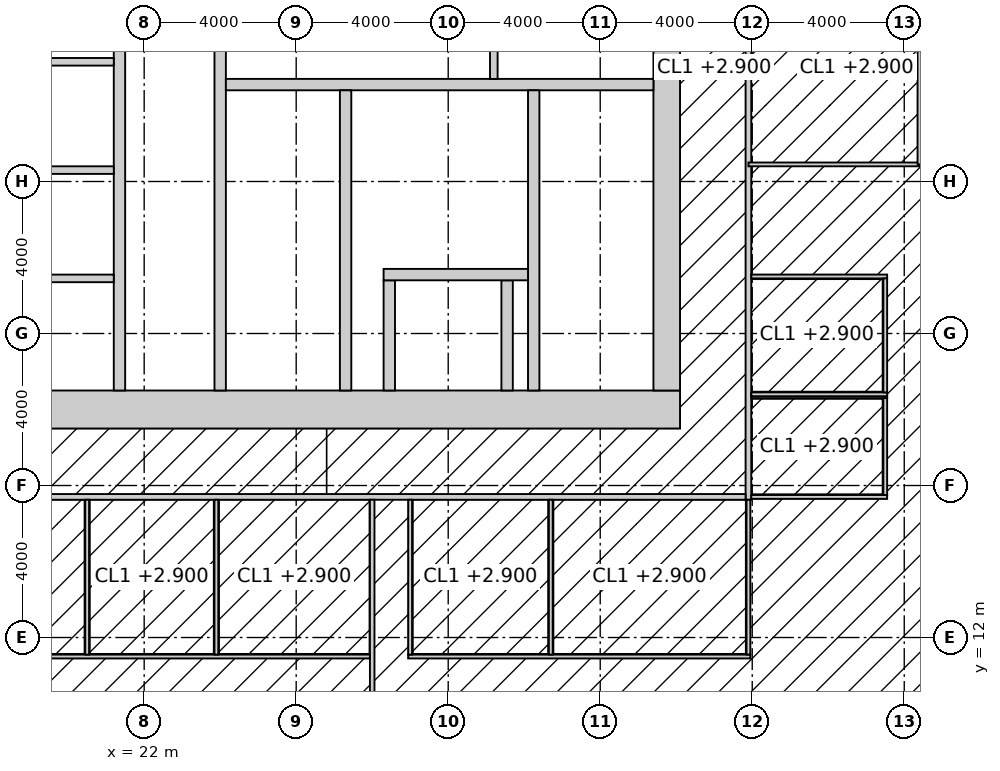
"""IFC4 building model, lengths in metres.
Left out: names, types, materials, properties, quantities, classifications, styles, units other than length and angle.
Written with IfcOpenShell. Run it as: python <this file> out.ifc"""

import sys

from ifc_helpers import new_model, si_unit, direction, frame, frame_2d, origin, place, context, subcontext, project, spatial, rectangle, extrude, element, fill, save


model = new_model("IFC4")
c1 = context("Model", 3, precision=1e-05, world=origin(), true_north=direction((0.0, 1.0)))
c2 = subcontext(c1, "Body", "Model", "MODEL_VIEW")
j1 = project(units=[si_unit("LENGTHUNIT", "METRE"), si_unit("PLANEANGLEUNIT", "RADIAN")], contexts=[c1])
p1 = place(None, origin())
s1 = spatial("IfcSite", under=j1, at=p1, CompositionType="ELEMENT")
p2 = place(p1, origin())
s2 = spatial("IfcBuilding", under=s1, at=p2, CompositionType="ELEMENT")
p3 = place(p2, frame((0.0, 0.0, 147.8)))
s3 = spatial("IfcBuildingStorey", under=s2, at=p3, CompositionType="ELEMENT", Elevation=147.8)
p4 = place(p3, frame((18.5, 18.0, -0.15), z_axis=(0.0, 0.0, 1.0), x_axis=(1.0, 0.0, 0.0)))
e1 = element("IfcWall", 1, at=p4, inside=s3, PredefinedType="SHEAR", context=c2, shape_type="SweptSolid", body=[
    extrude(rectangle(XDim=17.6, YDim=1.0, at=frame_2d((8.8, 0.0))), origin(), (0.0, 0.0, 1.0), 4.0),
])
p5 = place(p4, frame((3.45, 0.0, 0.15)))
e2 = element("IfcOpeningElement", 2, at=p5, cuts=e1, PredefinedType="OPENING", context=c2, shape_type="SweptSolid", body=[
    extrude(rectangle(XDim=1.5, YDim=2.4, at=frame_2d((0.75, 1.2))), frame((0.0, 0.51, 0.0), z_axis=(0.0, -1.0, 0.0), x_axis=(1.0, 0.0, 0.0)), (0.0, 0.0, 1.0), 1.02),
])
p6 = place(p3, frame((35.75, 18.5, -0.15), z_axis=(0.0, 0.0, 1.0), x_axis=(0.0, 1.0, 0.0)))
e3 = element("IfcWall", 3, at=p6, inside=s3, PredefinedType="SHEAR", context=c2, shape_type="SweptSolid", body=[
    extrude(rectangle(XDim=17.0, YDim=0.7, at=frame_2d((8.5, 0.0))), origin(), (0.0, 0.0, 1.0), 4.0),
])
p7 = place(p6, frame((9.85, 0.0, 0.15)))
e4 = element("IfcOpeningElement", 4, at=p7, cuts=e3, PredefinedType="OPENING", context=c2, shape_type="SweptSolid", body=[
    extrude(rectangle(XDim=1.0, YDim=2.2, at=frame_2d((0.5, 1.1))), frame((0.0, 0.36, 0.0), z_axis=(0.0, -1.0, 0.0), x_axis=(1.0, 0.0, 0.0)), (0.0, 0.0, 1.0), 0.72),
])
p8 = place(p3, frame((24.0, 18.5, -0.15), z_axis=(0.0, 0.0, 1.0), x_axis=(0.0, 1.0, 0.0)))
e5 = element("IfcWall", 5, at=p8, inside=s3, PredefinedType="SHEAR", context=c2, shape_type="SweptSolid", body=[
    extrude(rectangle(XDim=17.0, YDim=0.3, at=frame_2d((8.5, 0.0))), origin(), (0.0, 0.0, 1.0), 4.0),
])
p9 = place(p8, frame((9.6, 0.0, 0.15)))
e6 = element("IfcOpeningElement", 6, at=p9, cuts=e5, PredefinedType="OPENING", context=c2, shape_type="SweptSolid", body=[
    extrude(rectangle(XDim=1.5, YDim=2.4, at=frame_2d((0.75, 1.2))), frame((0.0, 0.16, 0.0), z_axis=(0.0, -1.0, 0.0), x_axis=(1.0, 0.0, 0.0)), (0.0, 0.0, 1.0), 0.32),
])
p10 = place(p3, frame((24.15, 26.55, -0.15), z_axis=(0.0, 0.0, 1.0), x_axis=(1.0, 0.0, 0.0)))
e7 = element("IfcWall", 7, at=p10, inside=s3, PredefinedType="SHEAR", context=c2, shape_type="SweptSolid", body=[
    extrude(rectangle(XDim=11.25, YDim=0.3, at=frame_2d((5.625, 0.0))), origin(), (0.0, 0.0, 1.0), 4.0),
])
p11 = place(p10, frame((9.25, 0.0, 0.15)))
e8 = element("IfcOpeningElement", 8, at=p11, cuts=e7, PredefinedType="OPENING", context=c2, shape_type="SweptSolid", body=[
    extrude(rectangle(XDim=1.0, YDim=2.2, at=frame_2d((0.5, 1.1))), frame((0.0, 0.16, 0.0), z_axis=(0.0, -1.0, 0.0), x_axis=(1.0, 0.0, 0.0)), (0.0, 0.0, 1.0), 0.32),
])
p12 = place(p10, frame((4.9, 0.0, 0.15)))
e9 = element("IfcOpeningElement", 9, at=p12, cuts=e7, PredefinedType="OPENING", context=c2, shape_type="SweptSolid", body=[
    extrude(rectangle(XDim=1.5, YDim=2.4, at=frame_2d((0.75, 1.2))), frame((0.0, 0.16, 0.0), z_axis=(0.0, -1.0, 0.0), x_axis=(1.0, 0.0, 0.0)), (0.0, 0.0, 1.0), 0.32),
])
p13 = place(p3, frame((27.3, 18.5, -0.15), z_axis=(0.0, 0.0, 1.0), x_axis=(0.0, 1.0, 0.0)))
e10 = element("IfcWall", 10, at=p13, inside=s3, PredefinedType="SHEAR", context=c2, shape_type="SweptSolid", body=[
    extrude(rectangle(XDim=7.9, YDim=0.3, at=frame_2d((3.95, 0.0))), origin(), (0.0, 0.0, 1.0), 4.0),
])
p14 = place(p13, frame((6.4, 0.0, 0.15)))
e11 = element("IfcOpeningElement", 11, at=p14, cuts=e10, PredefinedType="OPENING", context=c2, shape_type="SweptSolid", body=[
    extrude(rectangle(XDim=1.0, YDim=2.2, at=frame_2d((0.5, 1.1))), frame((0.0, 0.16, 0.0), z_axis=(0.0, -1.0, 0.0), x_axis=(1.0, 0.0, 0.0)), (0.0, 0.0, 1.0), 0.32),
])
p15 = place(p3, frame((32.25, 18.5, -0.15), z_axis=(0.0, 0.0, 1.0), x_axis=(0.0, 1.0, 0.0)))
e12 = element("IfcWall", 12, at=p15, inside=s3, PredefinedType="SHEAR", context=c2, shape_type="SweptSolid", body=[
    extrude(rectangle(XDim=7.9, YDim=0.3, at=frame_2d((3.95, 0.0))), origin(), (0.0, 0.0, 1.0), 4.0),
])
for number, where, z_axis, x_axis in (
    (13, (28.45, 18.5, -0.15), (0.0, 0.0, 1.0), (0.0, 1.0, 0.0)),
    (14, (31.55, 18.5, -0.15), (0.0, 0.0, 1.0), (0.0, 1.0, 0.0)),
):
    element("IfcWall", number, at=place(p3, frame(where, z_axis=z_axis, x_axis=x_axis)), inside=s3, PredefinedType="SHEAR", context=c2, shape_type="SweptSolid", body=[
        extrude(rectangle(XDim=2.9, YDim=0.3, at=frame_2d((1.45, 0.0))), origin(), (0.0, 0.0, 1.0), 4.0),
    ])
p16 = place(p3, frame((28.3, 21.55, -0.15), z_axis=(0.0, 0.0, 1.0), x_axis=(1.0, 0.0, 0.0)))
e15 = element("IfcWall", 15, at=p16, inside=s3, PredefinedType="SHEAR", context=c2, shape_type="SweptSolid", body=[
    extrude(rectangle(XDim=3.8, YDim=0.3, at=frame_2d((1.9, 0.0))), origin(), (0.0, 0.0, 1.0), 4.0),
])
p17 = place(p16, frame((1.05, 0.0, 0.15)))
e16 = element("IfcOpeningElement", 16, at=p17, cuts=e15, PredefinedType="OPENING", context=c2, shape_type="SweptSolid", body=[
    extrude(rectangle(XDim=1.3, YDim=2.4, at=frame_2d((0.65, 1.2))), frame((0.0, 0.16, 0.0), z_axis=(0.0, -1.0, 0.0), x_axis=(1.0, 0.0, 0.0)), (0.0, 0.0, 1.0), 0.32),
])
p18 = place(p3, frame((21.35, 18.5, -0.15), z_axis=(0.0, 0.0, 1.0), x_axis=(0.0, 1.0, 0.0)))
e17 = element("IfcWall", 17, at=p18, inside=s3, PredefinedType="SHEAR", context=c2, shape_type="SweptSolid", body=[
    extrude(rectangle(XDim=12.5, YDim=0.3, at=frame_2d((6.25, 0.0))), origin(), (0.0, 0.0, 1.0), 4.0),
])
p19 = place(p18, frame((0.875, 0.0, 0.15)))
e18 = element("IfcOpeningElement", 18, at=p19, cuts=e17, PredefinedType="OPENING", context=c2, shape_type="SweptSolid", body=[
    extrude(rectangle(XDim=1.1, YDim=2.2, at=frame_2d((0.55, 1.1))), frame((0.0, 0.16, 0.0), z_axis=(0.0, -1.0, 0.0), x_axis=(1.0, 0.0, 0.0)), (0.0, 0.0, 1.0), 0.32),
])
p20 = place(p18, frame((3.825, 0.0, 0.15)))
e19 = element("IfcOpeningElement", 19, at=p20, cuts=e17, PredefinedType="OPENING", context=c2, shape_type="SweptSolid", body=[
    extrude(rectangle(XDim=1.1, YDim=2.2, at=frame_2d((0.55, 1.1))), frame((0.0, 0.16, 0.0), z_axis=(0.0, -1.0, 0.0), x_axis=(1.0, 0.0, 0.0)), (0.0, 0.0, 1.0), 0.32),
])
p21 = place(p18, frame((6.675, 0.0, 0.15)))
e20 = element("IfcOpeningElement", 20, at=p21, cuts=e17, PredefinedType="OPENING", context=c2, shape_type="SweptSolid", body=[
    extrude(rectangle(XDim=1.1, YDim=2.2, at=frame_2d((0.55, 1.1))), frame((0.0, 0.16, 0.0), z_axis=(0.0, -1.0, 0.0), x_axis=(1.0, 0.0, 0.0)), (0.0, 0.0, 1.0), 0.32),
])
p22 = place(p18, frame((9.575, 0.0, 0.15)))
e21 = element("IfcOpeningElement", 21, at=p22, cuts=e17, PredefinedType="OPENING", context=c2, shape_type="SweptSolid", body=[
    extrude(rectangle(XDim=1.1, YDim=2.2, at=frame_2d((0.55, 1.1))), frame((0.0, 0.16, 0.0), z_axis=(0.0, -1.0, 0.0), x_axis=(1.0, 0.0, 0.0)), (0.0, 0.0, 1.0), 0.32),
])
for number, where, z_axis, x_axis in (
    (22, (18.5, 21.45, -0.15), (0.0, 0.0, 1.0), (1.0, 0.0, 0.0)),
    (23, (18.5, 24.3, -0.15), (0.0, 0.0, 1.0), (1.0, 0.0, 0.0)),
    (24, (18.5, 27.15, -0.15), (0.0, 0.0, 1.0), (1.0, 0.0, 0.0)),
):
    element("IfcWall", number, at=place(p3, frame(where, z_axis=z_axis, x_axis=x_axis)), inside=s3, PredefinedType="SOLIDWALL", context=c2, shape_type="SweptSolid", body=[
        extrude(rectangle(XDim=2.7, YDim=0.2, at=frame_2d((1.35, 0.0))), origin(), (0.0, 0.0, 1.0), 4.0),
    ])
p23 = place(p3, frame((31.2, 26.7, 0.0), z_axis=(0.0, 0.0, 1.0), x_axis=(0.0, 1.0, 0.0)))
e25 = element("IfcWall", 25, at=p23, inside=s3, PredefinedType="SOLIDWALL", context=c2, shape_type="SweptSolid", body=[
    extrude(rectangle(XDim=4.3, YDim=0.2, at=frame_2d((2.15, 0.0))), origin(), (0.0, 0.0, 1.0), 3.85),
])
p24 = place(p3, frame((37.9, 15.625, 0.0), z_axis=(0.0, 0.0, 1.0), x_axis=(0.0, 1.0, 0.0)))
e26 = element("IfcWall", 26, at=p24, inside=s3, PredefinedType="PARTITIONING", context=c2, shape_type="SweptSolid", body=[
    extrude(rectangle(XDim=22.75, YDim=0.15, at=frame_2d((11.375, 0.0))), origin(), (0.0, 0.0, 1.0), 2.95),
])
p25 = place(p24, frame((10.475, 0.0, 0.0)))
e27 = element("IfcOpeningElement", 27, at=p25, cuts=e26, PredefinedType="OPENING", context=c2, shape_type="SweptSolid", body=[
    extrude(rectangle(XDim=1.8, YDim=2.4, at=frame_2d((0.9, 1.2))), frame((0.0, 0.085, 0.0), z_axis=(0.0, -1.0, 0.0), x_axis=(1.0, 0.0, 0.0)), (0.0, 0.0, 1.0), 0.17),
])
p26 = place(p3, frame((15.175, 15.7, 0.0), z_axis=(0.0, 0.0, 1.0), x_axis=(1.0, 0.0, 0.0)))
e28 = element("IfcWall", 28, at=p26, inside=s3, PredefinedType="PARTITIONING", context=c2, shape_type="SweptSolid", body=[
    extrude(rectangle(XDim=22.65, YDim=0.15, at=frame_2d((11.325, 0.0))), origin(), (0.0, 0.0, 1.0), 3.85),
])
p27 = place(p3, frame((28.0, 4.3, 0.0), z_axis=(0.0, 0.0, 1.0), x_axis=(0.0, 1.0, 0.0)))
e29 = element("IfcWall", 29, at=p27, inside=s3, PredefinedType="PARTITIONING", context=c2, shape_type="SweptSolid", body=[
    extrude(rectangle(XDim=11.325, YDim=0.12, at=frame_2d((5.663, 0.0))), origin(), (0.0, 0.0, 1.0), 3.85),
])
p28 = place(p3, frame((15.05, 11.5, 0.0), z_axis=(0.0, 0.0, 1.0), x_axis=(1.0, 0.0, 0.0)))
e30 = element("IfcWall", 30, at=p28, inside=s3, PredefinedType="PARTITIONING", context=c2, shape_type="SweptSolid", body=[
    extrude(rectangle(XDim=12.889, YDim=0.1, at=frame_2d((6.444, 0.0))), origin(), (0.0, 0.0, 1.0), 3.85),
])
p29 = place(p28, frame((2.25, 0.0, 0.0)))
e31 = element("IfcOpeningElement", 31, at=p29, cuts=e30, PredefinedType="OPENING", context=c2, shape_type="SweptSolid", body=[
    extrude(rectangle(XDim=1.0, YDim=2.2, at=frame_2d((0.5, 1.1))), frame((0.0, 0.06, 0.0), z_axis=(0.0, -1.0, 0.0), x_axis=(1.0, 0.0, 0.0)), (0.0, 0.0, 1.0), 0.12),
])
p30 = place(p28, frame((6.65, 0.0, 0.0)))
e32 = element("IfcOpeningElement", 32, at=p30, cuts=e30, PredefinedType="OPENING", context=c2, shape_type="SweptSolid", body=[
    extrude(rectangle(XDim=1.0, YDim=2.2, at=frame_2d((0.5, 1.1))), frame((0.0, 0.06, 0.0), z_axis=(0.0, -1.0, 0.0), x_axis=(1.0, 0.0, 0.0)), (0.0, 0.0, 1.0), 0.12),
])
p31 = place(p28, frame((10.399, 0.0, 0.0)))
e33 = element("IfcOpeningElement", 33, at=p31, cuts=e30, PredefinedType="OPENING", context=c2, shape_type="SweptSolid", body=[
    extrude(rectangle(XDim=1.0, YDim=2.2, at=frame_2d((0.5, 1.1))), frame((0.0, 0.06, 0.0), z_axis=(0.0, -1.0, 0.0), x_axis=(1.0, 0.0, 0.0)), (0.0, 0.0, 1.0), 0.12),
])
p32 = place(p3, frame((28.949, 11.5, 0.0), z_axis=(0.0, 0.0, 1.0), x_axis=(1.0, 0.0, 0.0)))
e34 = element("IfcWall", 34, at=p32, inside=s3, PredefinedType="PARTITIONING", context=c2, shape_type="SweptSolid", body=[
    extrude(rectangle(XDim=9.001, YDim=0.1, at=frame_2d((4.5, 0.0))), origin(), (0.0, 0.0, 1.0), 3.85),
])
p33 = place(p32, frame((1.4, 0.0, 0.0)))
e35 = element("IfcOpeningElement", 35, at=p33, cuts=e34, PredefinedType="OPENING", context=c2, shape_type="SweptSolid", body=[
    extrude(rectangle(XDim=1.0, YDim=2.2, at=frame_2d((0.5, 1.1))), frame((0.0, 0.06, 0.0), z_axis=(0.0, -1.0, 0.0), x_axis=(1.0, 0.0, 0.0)), (0.0, 0.0, 1.0), 0.12),
])
p34 = place(p32, frame((5.851, 0.0, 0.0)))
e36 = element("IfcOpeningElement", 36, at=p34, cuts=e34, PredefinedType="OPENING", context=c2, shape_type="SweptSolid", body=[
    extrude(rectangle(XDim=1.0, YDim=2.2, at=frame_2d((0.5, 1.1))), frame((0.0, 0.06, 0.0), z_axis=(0.0, -1.0, 0.0), x_axis=(1.0, 0.0, 0.0)), (0.0, 0.0, 1.0), 0.12),
])
for number, where, z_axis, x_axis in (
    (37, (37.975, 15.7, 0.0), (0.0, 0.0, 1.0), (1.0, 0.0, 0.0)),
    (38, (37.975, 18.35, 0.0), (0.0, 0.0, 1.0), (1.0, 0.0, 0.0)),
    (39, (37.975, 18.4, 0.0), (0.0, 0.0, 1.0), (1.0, 0.0, 0.0)),
    (40, (37.975, 21.5, 0.0), (0.0, 0.0, 1.0), (1.0, 0.0, 0.0)),
):
    element("IfcWall", number, at=place(p3, frame(where, z_axis=z_axis, x_axis=x_axis)), inside=s3, PredefinedType="PARTITIONING", context=c2, shape_type="SweptSolid", body=[
        extrude(rectangle(XDim=3.575, YDim=0.1, at=frame_2d((1.788, 0.0))), origin(), (0.0, 0.0, 1.0), 3.85),
    ])
for number, where, z_axis, x_axis in (
    (41, (20.5, 11.55, 0.0), (0.0, 0.0, 1.0), (0.0, 1.0, 0.0)),
    (42, (23.9, 11.55, 0.0), (0.0, 0.0, 1.0), (0.0, 1.0, 0.0)),
    (43, (28.999, 11.55, 0.0), (0.0, 0.0, 1.0), (0.0, 1.0, 0.0)),
    (44, (32.699, 11.55, 0.0), (0.0, 0.0, 1.0), (0.0, 1.0, 0.0)),
):
    element("IfcWall", number, at=place(p3, frame(where, z_axis=z_axis, x_axis=x_axis)), inside=s3, PredefinedType="PARTITIONING", context=c2, shape_type="SweptSolid", body=[
        extrude(rectangle(XDim=4.075, YDim=0.1, at=frame_2d((2.038, 0.0))), origin(), (0.0, 0.0, 1.0), 3.85),
    ])
p35 = place(p3, frame((37.9, 11.55, 0.0), z_axis=(0.0, 0.0, 1.0), x_axis=(0.0, 1.0, 0.0)))
e45 = element("IfcWall", 45, at=p35, inside=s3, PredefinedType="PARTITIONING", context=c2, shape_type="SweptSolid", body=[
    extrude(rectangle(XDim=4.075, YDim=0.1, at=frame_2d((2.038, 0.0))), origin(), (0.0, 0.0, 1.0), 2.95),
])
p36 = place(p3, frame((41.5, 15.75, 0.0), z_axis=(0.0, 0.0, 1.0), x_axis=(0.0, 1.0, 0.0)))
e46 = element("IfcWall", 46, at=p36, inside=s3, PredefinedType="PARTITIONING", context=c2, shape_type="SweptSolid", body=[
    extrude(rectangle(XDim=2.55, YDim=0.1, at=frame_2d((1.275, 0.0))), origin(), (0.0, 0.0, 1.0), 3.85),
])
p37 = place(p36, frame((0.775, 0.0, 0.0)))
e47 = element("IfcOpeningElement", 47, at=p37, cuts=e46, PredefinedType="OPENING", context=c2, shape_type="SweptSolid", body=[
    extrude(rectangle(XDim=1.0, YDim=2.2, at=frame_2d((0.5, 1.1))), frame((0.0, 0.06, 0.0), z_axis=(0.0, -1.0, 0.0), x_axis=(1.0, 0.0, 0.0)), (0.0, 0.0, 1.0), 0.12),
])
p38 = place(p3, frame((41.5, 18.45, 0.0), z_axis=(0.0, 0.0, 1.0), x_axis=(0.0, 1.0, 0.0)))
e48 = element("IfcWall", 48, at=p38, inside=s3, PredefinedType="PARTITIONING", context=c2, shape_type="SweptSolid", body=[
    extrude(rectangle(XDim=3.0, YDim=0.1, at=frame_2d((1.5, 0.0))), origin(), (0.0, 0.0, 1.0), 3.85),
])
p39 = place(p38, frame((1.0, 0.0, 0.0)))
e49 = element("IfcOpeningElement", 49, at=p39, cuts=e48, PredefinedType="OPENING", context=c2, shape_type="SweptSolid", body=[
    extrude(rectangle(XDim=1.0, YDim=2.2, at=frame_2d((0.5, 1.1))), frame((0.0, 0.06, 0.0), z_axis=(0.0, -1.0, 0.0), x_axis=(1.0, 0.0, 0.0)), (0.0, 0.0, 1.0), 0.12),
])
p40 = place(p3, frame((37.9, 24.45, 0.0), z_axis=(0.0, 0.0, 1.0), x_axis=(1.0, 0.0, 0.0)))
e50 = element("IfcWall", 50, at=p40, inside=s3, PredefinedType="PARTITIONING", context=c2, shape_type="SweptSolid", body=[
    extrude(rectangle(XDim=4.5, YDim=0.1, at=frame_2d((2.25, 0.0))), origin(), (0.0, 0.0, 1.0), 3.85),
])
p41 = place(p3, frame((42.4, 24.45, 0.0), z_axis=(0.0, 0.0, 1.0), x_axis=(0.0, 1.0, 0.0)))
e51 = element("IfcWall", 51, at=p41, inside=s3, PredefinedType="PARTITIONING", context=c2, shape_type="SweptSolid", body=[
    extrude(rectangle(XDim=5.1, YDim=0.1, at=frame_2d((2.55, 0.0))), origin(), (0.0, 0.0, 1.0), 3.85),
])
p42 = place(p41, frame((2.05, 0.0, 0.0)))
e52 = element("IfcOpeningElement", 52, at=p42, cuts=e51, PredefinedType="OPENING", context=c2, shape_type="SweptSolid", body=[
    extrude(rectangle(XDim=1.0, YDim=2.2, at=frame_2d((0.5, 1.1))), frame((0.0, 0.06, 0.0), z_axis=(0.0, -1.0, 0.0), x_axis=(1.0, 0.0, 0.0)), (0.0, 0.0, 1.0), 0.12),
])
p43 = place(p14, origin())
e53 = element("IfcDoor", 53, at=p43, inside=s3, OperationType="SINGLE_SWING_RIGHT", PredefinedType="DOOR", context=c2, shape_type="SweptSolid", body=[
    extrude(rectangle(XDim=1.0, YDim=2.2, at=frame_2d((0.5, 1.1))), frame((0.0, 0.025, 0.0), z_axis=(0.0, -1.0, 0.0), x_axis=(1.0, 0.0, 0.0)), (0.0, 0.0, 1.0), 0.05),
])
fill(e11, e53)
p44 = place(p11, frame((1.0, 0.0, 0.0), z_axis=(0.0, 0.0, 1.0), x_axis=(-1.0, 0.0, 0.0)))
e54 = element("IfcDoor", 54, at=p44, inside=s3, OperationType="SINGLE_SWING_RIGHT", PredefinedType="DOOR", context=c2, shape_type="SweptSolid", body=[
    extrude(rectangle(XDim=1.0, YDim=2.2, at=frame_2d((0.5, 1.1))), frame((0.0, 0.025, 0.0), z_axis=(0.0, -1.0, 0.0), x_axis=(1.0, 0.0, 0.0)), (0.0, 0.0, 1.0), 0.05),
])
fill(e8, e54)
p45 = place(p12, origin())
e55 = element("IfcDoor", 55, at=p45, inside=s3, OperationType="DOUBLE_DOOR_DOUBLE_SWING", PredefinedType="DOOR", context=c2, shape_type="SweptSolid", body=[
    extrude(rectangle(XDim=1.5, YDim=2.4, at=frame_2d((0.75, 1.2))), frame((0.0, 0.025, 0.0), z_axis=(0.0, -1.0, 0.0), x_axis=(1.0, 0.0, 0.0)), (0.0, 0.0, 1.0), 0.05),
])
fill(e9, e55)
p46 = place(p5, origin())
e56 = element("IfcDoor", 56, at=p46, inside=s3, OperationType="DOUBLE_DOOR_DOUBLE_SWING", PredefinedType="DOOR", context=c2, shape_type="SweptSolid", body=[
    extrude(rectangle(XDim=1.5, YDim=2.4, at=frame_2d((0.75, 1.2))), frame((0.0, 0.025, 0.0), z_axis=(0.0, -1.0, 0.0), x_axis=(1.0, 0.0, 0.0)), (0.0, 0.0, 1.0), 0.05),
])
fill(e2, e56)
p47 = place(p25, origin())
e57 = element("IfcDoor", 57, at=p47, inside=s3, OperationType="DOUBLE_DOOR_DOUBLE_SWING", PredefinedType="DOOR", context=c2, shape_type="SweptSolid", body=[
    extrude(rectangle(XDim=1.8, YDim=2.4, at=frame_2d((0.9, 1.2))), frame((0.0, 0.025, 0.0), z_axis=(0.0, -1.0, 0.0), x_axis=(1.0, 0.0, 0.0)), (0.0, 0.0, 1.0), 0.05),
])
fill(e27, e57)
p48 = place(p30, origin())
e58 = element("IfcDoor", 58, at=p48, inside=s3, OperationType="SINGLE_SWING_LEFT", PredefinedType="DOOR", context=c2, shape_type="SweptSolid", body=[
    extrude(rectangle(XDim=1.0, YDim=2.2, at=frame_2d((0.5, 1.1))), frame((0.0, 0.025, 0.0), z_axis=(0.0, -1.0, 0.0), x_axis=(1.0, 0.0, 0.0)), (0.0, 0.0, 1.0), 0.05),
])
fill(e32, e58)
p49 = place(p31, origin())
e59 = element("IfcDoor", 59, at=p49, inside=s3, OperationType="SINGLE_SWING_LEFT", PredefinedType="DOOR", context=c2, shape_type="SweptSolid", body=[
    extrude(rectangle(XDim=1.0, YDim=2.2, at=frame_2d((0.5, 1.1))), frame((0.0, 0.025, 0.0), z_axis=(0.0, -1.0, 0.0), x_axis=(1.0, 0.0, 0.0)), (0.0, 0.0, 1.0), 0.05),
])
fill(e33, e59)
p50 = place(p33, origin())
e60 = element("IfcDoor", 60, at=p50, inside=s3, OperationType="SINGLE_SWING_RIGHT", PredefinedType="DOOR", context=c2, shape_type="SweptSolid", body=[
    extrude(rectangle(XDim=1.0, YDim=2.2, at=frame_2d((0.5, 1.1))), frame((0.0, 0.025, 0.0), z_axis=(0.0, -1.0, 0.0), x_axis=(1.0, 0.0, 0.0)), (0.0, 0.0, 1.0), 0.05),
])
fill(e35, e60)
p51 = place(p34, origin())
e61 = element("IfcDoor", 61, at=p51, inside=s3, OperationType="SINGLE_SWING_LEFT", PredefinedType="DOOR", context=c2, shape_type="SweptSolid", body=[
    extrude(rectangle(XDim=1.0, YDim=2.2, at=frame_2d((0.5, 1.1))), frame((0.0, 0.025, 0.0), z_axis=(0.0, -1.0, 0.0), x_axis=(1.0, 0.0, 0.0)), (0.0, 0.0, 1.0), 0.05),
])
fill(e36, e61)
p52 = place(p37, origin())
e62 = element("IfcDoor", 62, at=p52, inside=s3, OperationType="SINGLE_SWING_LEFT", PredefinedType="DOOR", context=c2, shape_type="SweptSolid", body=[
    extrude(rectangle(XDim=1.0, YDim=2.2, at=frame_2d((0.5, 1.1))), frame((0.0, 0.025, 0.0), z_axis=(0.0, -1.0, 0.0), x_axis=(1.0, 0.0, 0.0)), (0.0, 0.0, 1.0), 0.05),
])
fill(e47, e62)
p53 = place(p39, origin())
e63 = element("IfcDoor", 63, at=p53, inside=s3, OperationType="SINGLE_SWING_LEFT", PredefinedType="DOOR", context=c2, shape_type="SweptSolid", body=[
    extrude(rectangle(XDim=1.0, YDim=2.2, at=frame_2d((0.5, 1.1))), frame((0.0, 0.025, 0.0), z_axis=(0.0, -1.0, 0.0), x_axis=(1.0, 0.0, 0.0)), (0.0, 0.0, 1.0), 0.05),
])
fill(e49, e63)
p54 = place(p42, origin())
e64 = element("IfcDoor", 64, at=p54, inside=s3, OperationType="SINGLE_SWING_RIGHT", PredefinedType="DOOR", context=c2, shape_type="SweptSolid", body=[
    extrude(rectangle(XDim=1.0, YDim=2.2, at=frame_2d((0.5, 1.1))), frame((0.0, 0.025, 0.0), z_axis=(0.0, -1.0, 0.0), x_axis=(1.0, 0.0, 0.0)), (0.0, 0.0, 1.0), 0.05),
])
fill(e52, e64)
p55 = place(p17, origin())
e65 = element("IfcDoor", 65, at=p55, inside=s3, OperationType="DOUBLE_DOOR_SLIDING", PredefinedType="DOOR", context=c2, shape_type="SweptSolid", body=[
    extrude(rectangle(XDim=1.3, YDim=2.4, at=frame_2d((0.65, 1.2))), frame((0.0, 0.025, 0.0), z_axis=(0.0, -1.0, 0.0), x_axis=(1.0, 0.0, 0.0)), (0.0, 0.0, 1.0), 0.05),
])
fill(e16, e65)
p56 = place(p19, origin())
e66 = element("IfcDoor", 66, at=p56, inside=s3, OperationType="DOUBLE_DOOR_SLIDING", PredefinedType="DOOR", context=c2, shape_type="SweptSolid", body=[
    extrude(rectangle(XDim=1.1, YDim=2.2, at=frame_2d((0.55, 1.1))), frame((0.0, 0.025, 0.0), z_axis=(0.0, -1.0, 0.0), x_axis=(1.0, 0.0, 0.0)), (0.0, 0.0, 1.0), 0.05),
])
fill(e18, e66)
p57 = place(p20, origin())
e67 = element("IfcDoor", 67, at=p57, inside=s3, OperationType="DOUBLE_DOOR_SLIDING", PredefinedType="DOOR", context=c2, shape_type="SweptSolid", body=[
    extrude(rectangle(XDim=1.1, YDim=2.2, at=frame_2d((0.55, 1.1))), frame((0.0, 0.025, 0.0), z_axis=(0.0, -1.0, 0.0), x_axis=(1.0, 0.0, 0.0)), (0.0, 0.0, 1.0), 0.05),
])
fill(e19, e67)
p58 = place(p21, origin())
e68 = element("IfcDoor", 68, at=p58, inside=s3, OperationType="DOUBLE_DOOR_SLIDING", PredefinedType="DOOR", context=c2, shape_type="SweptSolid", body=[
    extrude(rectangle(XDim=1.1, YDim=2.2, at=frame_2d((0.55, 1.1))), frame((0.0, 0.025, 0.0), z_axis=(0.0, -1.0, 0.0), x_axis=(1.0, 0.0, 0.0)), (0.0, 0.0, 1.0), 0.05),
])
fill(e20, e68)
save(model, sys.argv[1])
